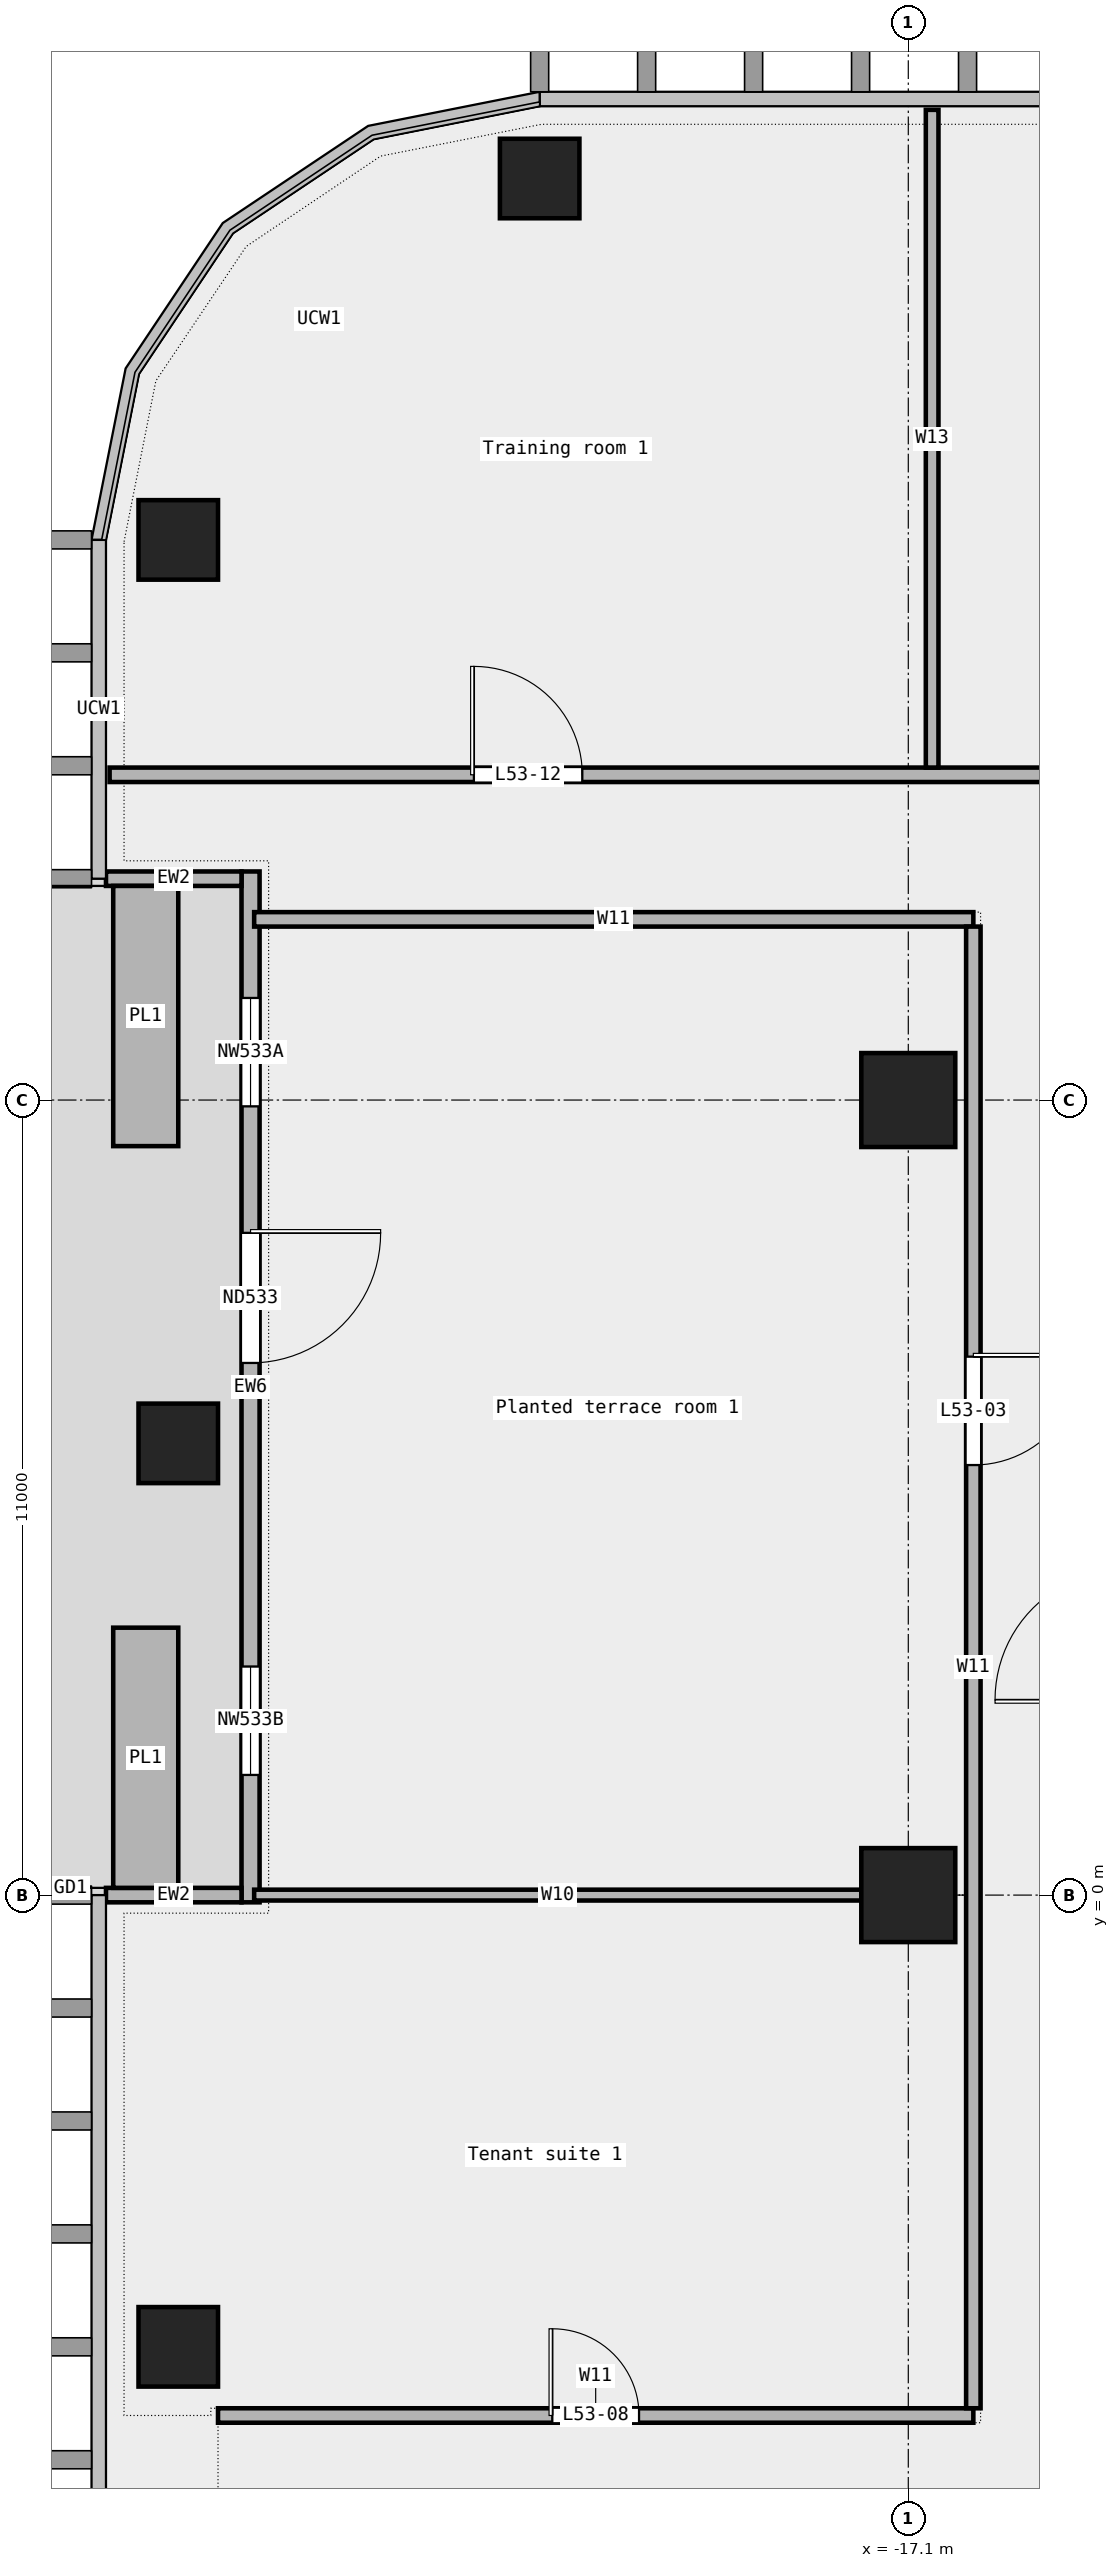
"""IFC4 building model, lengths in metres.
Left out: names, types, materials, properties, quantities, classifications, styles, units other than length and angle.
Written with IfcOpenShell. Run it as: python <this file> out.ifc"""

import sys

from ifc_helpers import new_model, si_unit, direction, frame, frame_2d, origin, origin_2d, place, context, subcontext, project, spatial, rectangle, extrude, element, fill, save


model = new_model("IFC4")
c1 = context("Model", 3, precision=1e-05, world=origin(), true_north=direction((0.0, 1.0)))
c2 = subcontext(c1, "Body", "Model", "MODEL_VIEW")
j1 = project(units=[si_unit("LENGTHUNIT", "METRE"), si_unit("PLANEANGLEUNIT", "RADIAN")], contexts=[c1])
p1 = place(None, origin())
s1 = spatial("IfcSite", under=j1, at=p1, CompositionType="ELEMENT")
p2 = place(p1, origin())
s2 = spatial("IfcBuilding", under=s1, at=p2, CompositionType="ELEMENT")
p3 = place(p2, frame((0.0, 0.0, 247.0)))
s3 = spatial("IfcBuildingStorey", under=s2, at=p3, CompositionType="ELEMENT", Elevation=247.0)
for number, where, z_axis, x_axis in (
    (1, (-22.2, 23.75, 0.0), (0.0, 0.0, 1.0), (1.0, 0.0, 0.0)),
    (2, (-27.2, 18.75, 0.0), (0.0, 0.0, 1.0), (1.0, 0.0, 0.0)),
    (3, (-27.2, 6.25, 0.0), (0.0, 0.0, 1.0), (1.0, 0.0, 0.0)),
    (4, (-27.2, -6.25, 0.0), (0.0, 0.0, 1.0), (1.0, 0.0, 0.0)),
):
    element("IfcColumn", number, at=place(p3, frame(where, z_axis=z_axis, x_axis=x_axis)), inside=s3, PredefinedType="COLUMN", context=c2, shape_type="SweptSolid", body=[
        extrude(rectangle(XDim=1.1, YDim=1.1, at=origin_2d()), origin(), (0.0, 0.0, 1.0), 3.6),
    ])
for number, where, z_axis, x_axis in (
    (5, (-17.1, 0.0, 0.0), (0.0, 0.0, 1.0), (1.0, 0.0, 0.0)),
    (6, (-17.1, 11.0, 0.0), (0.0, 0.0, 1.0), (1.0, 0.0, 0.0)),
):
    element("IfcColumn", number, at=place(p3, frame(where, z_axis=z_axis, x_axis=x_axis)), inside=s3, PredefinedType="COLUMN", context=c2, shape_type="SweptSolid", body=[
        extrude(rectangle(XDim=1.3, YDim=1.3, at=origin_2d()), origin(), (0.0, 0.0, 1.0), 3.6),
    ])
p4 = place(p3, frame((-26.2, 14.163, 0.0), z_axis=(0.0, 0.0, 1.0), x_axis=(0.0, -1.0, 0.0)))
e7 = element("IfcWall", 7, at=p4, inside=s3, PredefinedType="STANDARD", context=c2, shape_type="SweptSolid", body=[
    extrude(rectangle(XDim=14.263, YDim=0.25, at=frame_2d((7.131, 0.0))), origin(), (0.0, 0.0, 1.0), 3.6),
])
p5 = place(p4, frame((1.75, 0.0, 0.45)))
e8 = element("IfcOpeningElement", 8, at=p5, cuts=e7, PredefinedType="OPENING", context=c2, shape_type="SweptSolid", body=[
    extrude(rectangle(XDim=1.5, YDim=2.4, at=frame_2d((0.75, 1.2))), frame((0.0, 0.137, 0.0), z_axis=(0.0, -1.0, 0.0), x_axis=(1.0, 0.0, 0.0)), (0.0, 0.0, 1.0), 0.274),
])
p6 = place(p4, frame((5.0, 0.0, 0.0)))
e9 = element("IfcOpeningElement", 9, at=p6, cuts=e7, PredefinedType="OPENING", context=c2, shape_type="SweptSolid", body=[
    extrude(rectangle(XDim=1.8, YDim=2.4, at=frame_2d((0.9, 1.2))), frame((0.0, 0.137, 0.0), z_axis=(0.0, -1.0, 0.0), x_axis=(1.0, 0.0, 0.0)), (0.0, 0.0, 1.0), 0.274),
])
p7 = place(p4, frame((11.0, 0.0, 0.45)))
e10 = element("IfcOpeningElement", 10, at=p7, cuts=e7, PredefinedType="OPENING", context=c2, shape_type="SweptSolid", body=[
    extrude(rectangle(XDim=1.5, YDim=2.4, at=frame_2d((0.75, 1.2))), frame((0.0, 0.137, 0.0), z_axis=(0.0, -1.0, 0.0), x_axis=(1.0, 0.0, 0.0)), (0.0, 0.0, 1.0), 0.274),
])
for number, where, z_axis, x_axis in (
    (11, (-28.2, 14.062, 0.0), (0.0, 0.0, 1.0), (1.0, 0.0, 0.0)),
    (12, (-28.2, 0.0, 0.0), (0.0, 0.0, 1.0), (1.0, 0.0, 0.0)),
):
    element("IfcWall", number, at=place(p3, frame(where, z_axis=z_axis, x_axis=x_axis)), inside=s3, PredefinedType="STANDARD", context=c2, shape_type="SweptSolid", body=[
        extrude(rectangle(XDim=1.875, YDim=0.2, at=frame_2d((0.938, 0.0))), origin(), (0.0, 0.0, 1.0), 3.6),
    ])
for number, where, z_axis, x_axis in (
    (13, (-27.65, 13.962, 0.0), (0.0, 0.0, 1.0), (0.0, -1.0, 0.0)),
    (14, (-27.65, 3.7, 0.0), (0.0, 0.0, 1.0), (0.0, -1.0, 0.0)),
):
    element("IfcWall", number, at=place(p3, frame(where, z_axis=z_axis, x_axis=x_axis)), inside=s3, PredefinedType="STANDARD", context=c2, shape_type="SweptSolid", body=[
        extrude(rectangle(XDim=3.6, YDim=0.9, at=frame_2d((1.8, 0.0))), origin(), (0.0, 0.0, 1.0), 0.7),
    ])
p8 = place(p3, frame((-26.65, -7.2, 0.0), z_axis=(0.0, 0.0, 1.0), x_axis=(1.0, 0.0, 0.0)))
e15 = element("IfcWall", 15, at=p8, inside=s3, PredefinedType="PARTITIONING", context=c2, shape_type="SweptSolid", body=[
    extrude(rectangle(XDim=10.45, YDim=0.2, at=frame_2d((5.225, 0.0))), origin(), (0.0, 0.0, 1.0), 3.6),
])
p9 = place(p8, frame((4.625, 0.0, 0.0)))
e16 = element("IfcOpeningElement", 16, at=p9, cuts=e15, PredefinedType="OPENING", context=c2, shape_type="SweptSolid", body=[
    extrude(rectangle(XDim=1.2, YDim=2.1, at=frame_2d((0.6, 1.05))), frame((0.0, 0.112, 0.0), z_axis=(0.0, -1.0, 0.0), x_axis=(1.0, 0.0, 0.0)), (0.0, 0.0, 1.0), 0.224),
])
p10 = place(p3, frame((-26.15, 0.0, 0.0), z_axis=(0.0, 0.0, 1.0), x_axis=(1.0, 0.0, 0.0)))
e17 = element("IfcWall", 17, at=p10, inside=s3, PredefinedType="PARTITIONING", context=c2, shape_type="SweptSolid", body=[
    extrude(rectangle(XDim=8.4, YDim=0.15, at=frame_2d((4.2, 0.0))), origin(), (0.0, 0.0, 1.0), 3.6),
])
p11 = place(p3, frame((-26.15, 13.5, 0.0), z_axis=(0.0, 0.0, 1.0), x_axis=(1.0, 0.0, 0.0)))
e18 = element("IfcWall", 18, at=p11, inside=s3, PredefinedType="PARTITIONING", context=c2, shape_type="SweptSolid", body=[
    extrude(rectangle(XDim=9.95, YDim=0.2, at=frame_2d((4.975, 0.0))), origin(), (0.0, 0.0, 1.0), 3.6),
])
p12 = place(p3, frame((-28.15, 15.5, 0.0), z_axis=(0.0, 0.0, 1.0), x_axis=(1.0, 0.0, 0.0)))
e19 = element("IfcWall", 19, at=p12, inside=s3, PredefinedType="PARTITIONING", context=c2, shape_type="SweptSolid", body=[
    extrude(rectangle(XDim=56.3, YDim=0.2, at=frame_2d((28.15, 0.0))), origin(), (0.0, 0.0, 1.0), 3.6),
])
p13 = place(p12, frame((50.405, 0.0, 0.0)))
e20 = element("IfcOpeningElement", 20, at=p13, cuts=e19, PredefinedType="OPENING", context=c2, shape_type="SweptSolid", body=[
    extrude(rectangle(XDim=1.2, YDim=2.1, at=frame_2d((0.6, 1.05))), frame((0.0, 0.112, 0.0), z_axis=(0.0, -1.0, 0.0), x_axis=(1.0, 0.0, 0.0)), (0.0, 0.0, 1.0), 0.224),
])
p14 = place(p12, frame((38.5, 0.0, 0.0)))
e21 = element("IfcOpeningElement", 21, at=p14, cuts=e19, PredefinedType="OPENING", context=c2, shape_type="SweptSolid", body=[
    extrude(rectangle(XDim=1.5, YDim=2.1, at=frame_2d((0.75, 1.05))), frame((0.0, 0.112, 0.0), z_axis=(0.0, -1.0, 0.0), x_axis=(1.0, 0.0, 0.0)), (0.0, 0.0, 1.0), 0.224),
])
p15 = place(p12, frame((30.853, 0.0, 0.0)))
e22 = element("IfcOpeningElement", 22, at=p15, cuts=e19, PredefinedType="OPENING", context=c2, shape_type="SweptSolid", body=[
    extrude(rectangle(XDim=0.9, YDim=2.1, at=frame_2d((0.45, 1.05))), frame((0.0, 0.112, 0.0), z_axis=(0.0, -1.0, 0.0), x_axis=(1.0, 0.0, 0.0)), (0.0, 0.0, 1.0), 0.224),
])
p16 = place(p12, frame((19.798, 0.0, 0.0)))
e23 = element("IfcOpeningElement", 23, at=p16, cuts=e19, PredefinedType="OPENING", context=c2, shape_type="SweptSolid", body=[
    extrude(rectangle(XDim=1.8, YDim=2.1, at=frame_2d((0.9, 1.05))), frame((0.0, 0.112, 0.0), z_axis=(0.0, -1.0, 0.0), x_axis=(1.0, 0.0, 0.0)), (0.0, 0.0, 1.0), 0.224),
])
p17 = place(p12, frame((5.04, 0.0, 0.0)))
e24 = element("IfcOpeningElement", 24, at=p17, cuts=e19, PredefinedType="OPENING", context=c2, shape_type="SweptSolid", body=[
    extrude(rectangle(XDim=1.5, YDim=2.1, at=frame_2d((0.75, 1.05))), frame((0.0, 0.112, 0.0), z_axis=(0.0, -1.0, 0.0), x_axis=(1.0, 0.0, 0.0)), (0.0, 0.0, 1.0), 0.224),
])
p18 = place(p3, frame((-16.77, 15.6, 0.0), z_axis=(0.0, 0.0, 1.0), x_axis=(0.0, 1.0, 0.0)))
e25 = element("IfcWall", 25, at=p18, inside=s3, PredefinedType="PARTITIONING", context=c2, shape_type="SweptSolid", body=[
    extrude(rectangle(XDim=9.1, YDim=0.175, at=frame_2d((4.55, 0.0))), origin(), (0.0, 0.0, 1.0), 3.6),
])
p19 = place(p3, frame((-16.2, -7.1, 0.0), z_axis=(0.0, 0.0, 1.0), x_axis=(0.0, 1.0, 0.0)))
e26 = element("IfcWall", 26, at=p19, inside=s3, PredefinedType="PARTITIONING", context=c2, shape_type="SweptSolid", body=[
    extrude(rectangle(XDim=20.5, YDim=0.2, at=frame_2d((10.25, 0.0))), origin(), (0.0, 0.0, 1.0), 3.6),
])
p20 = place(p19, frame((13.05, 0.0, 0.0)))
e27 = element("IfcOpeningElement", 27, at=p20, cuts=e26, PredefinedType="OPENING", context=c2, shape_type="SweptSolid", body=[
    extrude(rectangle(XDim=1.5, YDim=2.1, at=frame_2d((0.75, 1.05))), frame((0.0, 0.112, 0.0), z_axis=(0.0, -1.0, 0.0), x_axis=(1.0, 0.0, 0.0)), (0.0, 0.0, 1.0), 0.224),
])
p21 = place(p5, origin())
e28 = element("IfcWindow", 28, at=p21, inside=s3, PartitioningType="SINGLE_PANEL", PredefinedType="WINDOW", context=c2, shape_type="SweptSolid", body=[
    extrude(rectangle(XDim=1.5, YDim=2.4, at=frame_2d((0.75, 1.2))), frame((0.0, 0.03, 0.0), z_axis=(0.0, -1.0, 0.0), x_axis=(1.0, 0.0, 0.0)), (0.0, 0.0, 1.0), 0.06),
])
fill(e8, e28)
p22 = place(p6, origin())
e29 = element("IfcDoor", 29, at=p22, inside=s3, OperationType="DOUBLE_DOOR_SINGLE_SWING", PredefinedType="DOOR", context=c2, shape_type="SweptSolid", body=[
    extrude(rectangle(XDim=1.8, YDim=2.4, at=frame_2d((0.9, 1.2))), frame((0.0, 0.025, 0.0), z_axis=(0.0, -1.0, 0.0), x_axis=(1.0, 0.0, 0.0)), (0.0, 0.0, 1.0), 0.05),
])
fill(e9, e29)
p23 = place(p7, origin())
e30 = element("IfcWindow", 30, at=p23, inside=s3, PartitioningType="SINGLE_PANEL", PredefinedType="WINDOW", context=c2, shape_type="SweptSolid", body=[
    extrude(rectangle(XDim=1.5, YDim=2.4, at=frame_2d((0.75, 1.2))), frame((0.0, 0.03, 0.0), z_axis=(0.0, -1.0, 0.0), x_axis=(1.0, 0.0, 0.0)), (0.0, 0.0, 1.0), 0.06),
])
fill(e10, e30)
p24 = place(p20, origin())
e31 = element("IfcDoor", 31, at=p24, inside=s3, OperationType="DOUBLE_DOOR_SINGLE_SWING", PredefinedType="DOOR", context=c2, shape_type="SweptSolid", body=[
    extrude(rectangle(XDim=1.5, YDim=2.1, at=frame_2d((0.75, 1.05))), frame((0.0, 0.025, 0.0), z_axis=(0.0, -1.0, 0.0), x_axis=(1.0, 0.0, 0.0)), (0.0, 0.0, 1.0), 0.05),
])
fill(e27, e31)
p25 = place(p9, origin())
e32 = element("IfcDoor", 32, at=p25, inside=s3, OperationType="SINGLE_SWING_LEFT", PredefinedType="DOOR", context=c2, shape_type="SweptSolid", body=[
    extrude(rectangle(XDim=1.2, YDim=2.1, at=frame_2d((0.6, 1.05))), frame((0.0, 0.025, 0.0), z_axis=(0.0, -1.0, 0.0), x_axis=(1.0, 0.0, 0.0)), (0.0, 0.0, 1.0), 0.05),
])
fill(e16, e32)
p26 = place(p17, origin())
e33 = element("IfcDoor", 33, at=p26, inside=s3, OperationType="DOUBLE_DOOR_SINGLE_SWING", PredefinedType="DOOR", context=c2, shape_type="SweptSolid", body=[
    extrude(rectangle(XDim=1.5, YDim=2.1, at=frame_2d((0.75, 1.05))), frame((0.0, 0.025, 0.0), z_axis=(0.0, -1.0, 0.0), x_axis=(1.0, 0.0, 0.0)), (0.0, 0.0, 1.0), 0.05),
])
fill(e24, e33)
save(model, sys.argv[1])
